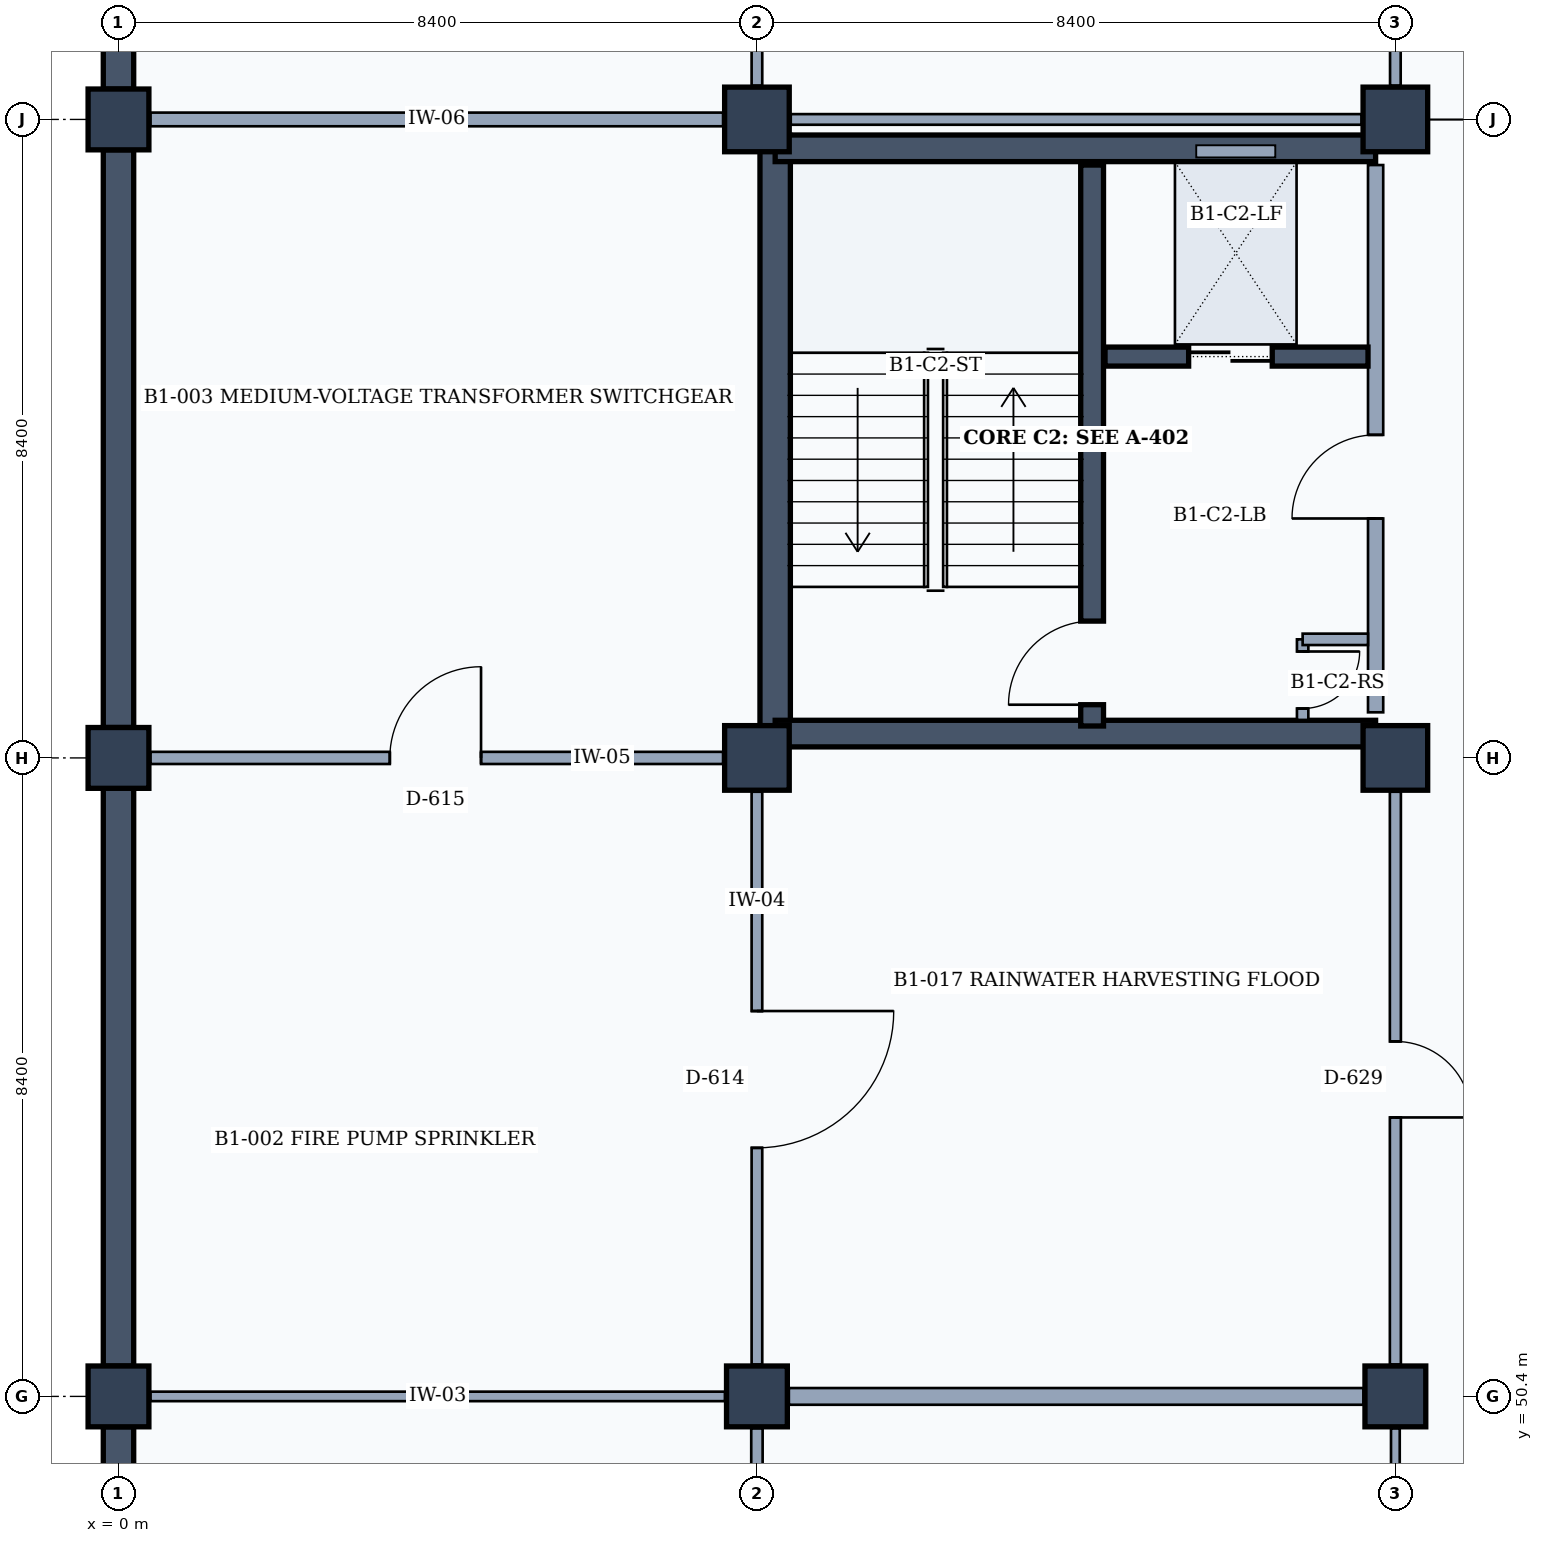
"""IFC4 building model, lengths in metres.
Left out: names, types, materials, properties, quantities, classifications, styles, units other than length and angle.
Written with IfcOpenShell. Run it as: python <this file> out.ifc"""

import sys

from ifc_helpers import new_model, si_unit, direction, frame, frame_2d, origin, origin_2d, place, context, subcontext, project, spatial, rectangle, extrude, element, fill, save


model = new_model("IFC4")
c1 = context("Model", 3, precision=1e-05, world=origin(), true_north=direction((0.0, 1.0)))
c2 = subcontext(c1, "Body", "Model", "MODEL_VIEW")
j1 = project(units=[si_unit("LENGTHUNIT", "METRE"), si_unit("PLANEANGLEUNIT", "RADIAN")], contexts=[c1])
p1 = place(None, origin())
s1 = spatial("IfcSite", under=j1, at=p1, CompositionType="ELEMENT")
p2 = place(p1, origin())
s2 = spatial("IfcBuilding", under=s1, at=p2, CompositionType="ELEMENT")
p3 = place(p2, frame((0.0, 0.0, -4.2)))
s3 = spatial("IfcBuildingStorey", under=s2, at=p3, CompositionType="ELEMENT", Elevation=-4.2)
for number, where, z_axis, x_axis in (
    (1, (0.0, 50.4, 0.0), (0.0, 0.0, 1.0), (1.0, 0.0, 0.0)),
    (2, (0.0, 58.8, 0.0), (0.0, 0.0, 1.0), (1.0, 0.0, 0.0)),
    (3, (0.0, 67.2, 0.0), (0.0, 0.0, 1.0), (1.0, 0.0, 0.0)),
    (4, (8.4, 50.4, 0.0), (0.0, 0.0, 1.0), (1.0, 0.0, 0.0)),
):
    element("IfcColumn", number, at=place(p3, frame(where, z_axis=z_axis, x_axis=x_axis)), inside=s3, PredefinedType="COLUMN", context=c2, shape_type="SweptSolid", body=[
        extrude(rectangle(XDim=0.8, YDim=0.8, at=origin_2d()), origin(), (0.0, 0.0, 1.0), 4.2),
    ])
for number, where, z_axis, x_axis in (
    (5, (8.4, 58.8, 0.0), (0.0, 0.0, 1.0), (1.0, 0.0, 0.0)),
    (6, (8.4, 67.2, 0.0), (0.0, 0.0, 1.0), (1.0, 0.0, 0.0)),
):
    element("IfcColumn", number, at=place(p3, frame(where, z_axis=z_axis, x_axis=x_axis)), inside=s3, PredefinedType="COLUMN", context=c2, shape_type="SweptSolid", body=[
        extrude(rectangle(XDim=0.85, YDim=0.85, at=origin_2d()), origin(), (0.0, 0.0, 1.0), 4.2),
    ])
p4 = place(p3, frame((16.8, 50.4, 0.0), z_axis=(0.0, 0.0, 1.0), x_axis=(1.0, 0.0, 0.0)))
e7 = element("IfcColumn", 7, at=p4, inside=s3, PredefinedType="COLUMN", context=c2, shape_type="SweptSolid", body=[
    extrude(rectangle(XDim=0.8, YDim=0.8, at=origin_2d()), origin(), (0.0, 0.0, 1.0), 4.2),
])
for number, where, z_axis, x_axis in (
    (8, (16.8, 58.8, 0.0), (0.0, 0.0, 1.0), (1.0, 0.0, 0.0)),
    (9, (16.8, 67.2, 0.0), (0.0, 0.0, 1.0), (1.0, 0.0, 0.0)),
):
    element("IfcColumn", number, at=place(p3, frame(where, z_axis=z_axis, x_axis=x_axis)), inside=s3, PredefinedType="COLUMN", context=c2, shape_type="SweptSolid", body=[
        extrude(rectangle(XDim=0.85, YDim=0.85, at=origin_2d()), origin(), (0.0, 0.0, 1.0), 4.2),
    ])
p5 = place(p3, frame((0.0, 42.325, 0.0), z_axis=(0.0, 0.0, 1.0), x_axis=(0.0, 1.0, 0.0)))
e10 = element("IfcWall", 10, at=p5, inside=s3, PredefinedType="STANDARD", context=c2, shape_type="SweptSolid", body=[
    extrude(rectangle(XDim=7.675, YDim=0.4, at=frame_2d((3.837, 0.0))), origin(), (0.0, 0.0, 1.0), 3.88),
])
p6 = place(p3, frame((0.0, 50.8, 0.0), z_axis=(0.0, 0.0, 1.0), x_axis=(0.0, 1.0, 0.0)))
e11 = element("IfcWall", 11, at=p6, inside=s3, PredefinedType="STANDARD", context=c2, shape_type="SweptSolid", body=[
    extrude(rectangle(XDim=7.6, YDim=0.4, at=frame_2d((3.8, 0.0))), origin(), (0.0, 0.0, 1.0), 3.88),
])
p7 = place(p3, frame((0.0, 59.2, 0.0), z_axis=(0.0, 0.0, 1.0), x_axis=(0.0, 1.0, 0.0)))
e12 = element("IfcWall", 12, at=p7, inside=s3, PredefinedType="STANDARD", context=c2, shape_type="SweptSolid", body=[
    extrude(rectangle(XDim=7.6, YDim=0.4, at=frame_2d((3.8, 0.0))), origin(), (0.0, 0.0, 1.0), 3.88),
])
p8 = place(p3, frame((0.0, 67.6, 0.0), z_axis=(0.0, 0.0, 1.0), x_axis=(0.0, 1.0, 0.0)))
e13 = element("IfcWall", 13, at=p8, inside=s3, PredefinedType="STANDARD", context=c2, shape_type="SweptSolid", body=[
    extrude(rectangle(XDim=7.6, YDim=0.4, at=frame_2d((3.8, 0.0))), origin(), (0.0, 0.0, 1.0), 3.88),
])
p9 = place(p3, frame((8.64, 59.05, 0.0), z_axis=(0.0, 0.0, 1.0), x_axis=(0.0, 1.0, 0.0)))
e14 = element("IfcWall", 14, at=p9, inside=s3, PredefinedType="SHEAR", context=c2, shape_type="SweptSolid", body=[
    extrude(rectangle(XDim=7.94, YDim=0.4, at=frame_2d((3.97, 0.0))), origin(), (0.0, 0.0, 1.0), 3.9),
])
p10 = place(p3, frame((8.64, 66.82, 0.0), z_axis=(0.0, 0.0, 1.0), x_axis=(1.0, 0.0, 0.0)))
e15 = element("IfcWall", 15, at=p10, inside=s3, PredefinedType="SHEAR", context=c2, shape_type="SweptSolid", body=[
    extrude(rectangle(XDim=7.9, YDim=0.35, at=frame_2d((3.95, 0.0))), origin(), (0.0, 0.0, 1.0), 3.9),
])
p11 = place(p3, frame((16.54, 66.6, 0.0), z_axis=(0.0, 0.0, 1.0), x_axis=(0.0, -1.0, 0.0)))
e16 = element("IfcWall", 16, at=p11, inside=s3, PredefinedType="PARTITIONING", context=c2, shape_type="SweptSolid", body=[
    extrude(rectangle(XDim=7.2, YDim=0.2, at=frame_2d((3.6, 0.0))), origin(), (0.0, 0.0, 1.0), 3.25),
])
p12 = place(p11, frame((3.55, 0.0, 0.0)))
e17 = element("IfcOpeningElement", 17, at=p12, cuts=e16, PredefinedType="OPENING", context=c2, shape_type="SweptSolid", body=[
    extrude(rectangle(XDim=1.1, YDim=2.15, at=frame_2d((0.55, 1.075))), frame((0.0, 0.11, 0.0), z_axis=(0.0, -1.0, 0.0), x_axis=(1.0, 0.0, 0.0)), (0.0, 0.0, 1.0), 0.22),
])
p13 = place(p3, frame((16.54, 59.12, 0.0), z_axis=(0.0, 0.0, 1.0), x_axis=(-1.0, 0.0, 0.0)))
e18 = element("IfcWall", 18, at=p13, inside=s3, PredefinedType="SHEAR", context=c2, shape_type="SweptSolid", body=[
    extrude(rectangle(XDim=7.9, YDim=0.35, at=frame_2d((3.95, 0.0))), origin(), (0.0, 0.0, 1.0), 3.9),
])
p14 = place(p3, frame((12.81, 59.22, 0.0), z_axis=(0.0, 0.0, 1.0), x_axis=(0.0, 1.0, 0.0)))
e19 = element("IfcWall", 19, at=p14, inside=s3, PredefinedType="SHEAR", context=c2, shape_type="SweptSolid", body=[
    extrude(rectangle(XDim=7.38, YDim=0.3, at=frame_2d((3.69, 0.0))), origin(), (0.0, 0.0, 1.0), 3.9),
])
p15 = place(p14, frame((0.28, 0.0, 0.0)))
e20 = element("IfcOpeningElement", 20, at=p15, cuts=e19, PredefinedType="OPENING", context=c2, shape_type="SweptSolid", body=[
    extrude(rectangle(XDim=1.1, YDim=2.15, at=frame_2d((0.55, 1.075))), frame((0.0, 0.16, 0.0), z_axis=(0.0, -1.0, 0.0), x_axis=(1.0, 0.0, 0.0)), (0.0, 0.0, 1.0), 0.32),
])
p16 = place(p3, frame((15.58, 60.36, 0.0), z_axis=(0.0, 0.0, 1.0), x_axis=(0.0, -1.0, 0.0)))
e21 = element("IfcWall", 21, at=p16, inside=s3, PredefinedType="PARTITIONING", context=c2, shape_type="SweptSolid", body=[
    extrude(rectangle(XDim=1.06, YDim=0.15, at=frame_2d((0.53, 0.0))), origin(), (0.0, 0.0, 1.0), 3.32),
])
p17 = place(p16, frame((0.16, 0.0, 0.0)))
e22 = element("IfcOpeningElement", 22, at=p17, cuts=e21, PredefinedType="OPENING", context=c2, shape_type="SweptSolid", body=[
    extrude(rectangle(XDim=0.75, YDim=2.05, at=frame_2d((0.375, 1.025))), frame((0.0, 0.085, 0.0), z_axis=(0.0, -1.0, 0.0), x_axis=(1.0, 0.0, 0.0)), (0.0, 0.0, 1.0), 0.17),
])
p18 = place(p3, frame((15.58, 60.36, 0.0), z_axis=(0.0, 0.0, 1.0), x_axis=(1.0, 0.0, 0.0)))
e23 = element("IfcWall", 23, at=p18, inside=s3, PredefinedType="PARTITIONING", context=c2, shape_type="SweptSolid", body=[
    extrude(rectangle(XDim=0.86, YDim=0.15, at=frame_2d((0.43, 0.0))), origin(), (0.0, 0.0, 1.0), 3.32),
])
p19 = place(p3, frame((12.98, 64.08, 0.0), z_axis=(0.0, 0.0, 1.0), x_axis=(1.0, 0.0, 0.0)))
e24 = element("IfcWall", 24, at=p19, inside=s3, PredefinedType="SHEAR", context=c2, shape_type="SweptSolid", body=[
    extrude(rectangle(XDim=3.46, YDim=0.25, at=frame_2d((1.73, 0.0))), origin(), (0.0, 0.0, 1.0), 3.9),
])
p20 = place(p19, frame((1.1, 0.0, 0.0)))
e25 = element("IfcOpeningElement", 25, at=p20, cuts=e24, PredefinedType="OPENING", context=c2, shape_type="SweptSolid", body=[
    extrude(rectangle(XDim=1.1, YDim=2.15, at=frame_2d((0.55, 1.075))), frame((0.0, 0.135, 0.0), z_axis=(0.0, -1.0, 0.0), x_axis=(1.0, 0.0, 0.0)), (0.0, 0.0, 1.0), 0.27),
])
p21 = place(p3, frame((8.4, 42.345, 0.0), z_axis=(0.0, 0.0, 1.0), x_axis=(0.0, 1.0, 0.0)))
e26 = element("IfcWall", 26, at=p21, inside=s3, PredefinedType="PARTITIONING", context=c2, shape_type="SweptSolid", body=[
    extrude(rectangle(XDim=7.635, YDim=0.15, at=frame_2d((3.817, 0.0))), origin(), (0.0, 0.0, 1.0), 3.25),
])
p22 = place(p21, frame((3.275, 0.0, 0.0)))
e27 = element("IfcOpeningElement", 27, at=p22, cuts=e26, PredefinedType="OPENING", context=c2, shape_type="SweptSolid", body=[
    extrude(rectangle(XDim=0.95, YDim=2.15, at=frame_2d((0.475, 1.075))), frame((0.0, 0.085, 0.0), z_axis=(0.0, -1.0, 0.0), x_axis=(1.0, 0.0, 0.0)), (0.0, 0.0, 1.0), 0.17),
])
p23 = place(p3, frame((0.42, 50.4, 0.0), z_axis=(0.0, 0.0, 1.0), x_axis=(1.0, 0.0, 0.0)))
e28 = element("IfcWall", 28, at=p23, inside=s3, PredefinedType="PARTITIONING", context=c2, shape_type="SweptSolid", body=[
    extrude(rectangle(XDim=7.56, YDim=0.125, at=frame_2d((3.78, 0.0))), origin(), (0.0, 0.0, 1.0), 3.05),
])
p24 = place(p3, frame((8.4, 50.82, 0.0), z_axis=(0.0, 0.0, 1.0), x_axis=(0.0, 1.0, 0.0)))
e29 = element("IfcWall", 29, at=p24, inside=s3, PredefinedType="PARTITIONING", context=c2, shape_type="SweptSolid", body=[
    extrude(rectangle(XDim=7.535, YDim=0.14, at=frame_2d((3.768, 0.0))), origin(), (0.0, 0.0, 1.0), 3.25),
])
p25 = place(p24, frame((2.85, 0.0, 0.0)))
e30 = element("IfcOpeningElement", 30, at=p25, cuts=e29, PredefinedType="OPENING", context=c2, shape_type="SweptSolid", body=[
    extrude(rectangle(XDim=1.8, YDim=2.3, at=frame_2d((0.9, 1.15))), frame((0.0, 0.08, 0.0), z_axis=(0.0, -1.0, 0.0), x_axis=(1.0, 0.0, 0.0)), (0.0, 0.0, 1.0), 0.16),
])
p26 = place(p3, frame((0.42, 58.8, 0.0), z_axis=(0.0, 0.0, 1.0), x_axis=(1.0, 0.0, 0.0)))
e31 = element("IfcWall", 31, at=p26, inside=s3, PredefinedType="PARTITIONING", context=c2, shape_type="SweptSolid", body=[
    extrude(rectangle(XDim=7.535, YDim=0.16, at=frame_2d((3.768, 0.0))), origin(), (0.0, 0.0, 1.0), 3.05),
])
p27 = place(p26, frame((3.15, 0.0, 0.0)))
e32 = element("IfcOpeningElement", 32, at=p27, cuts=e31, PredefinedType="OPENING", context=c2, shape_type="SweptSolid", body=[
    extrude(rectangle(XDim=1.2, YDim=2.2, at=frame_2d((0.6, 1.1))), frame((0.0, 0.09, 0.0), z_axis=(0.0, -1.0, 0.0), x_axis=(1.0, 0.0, 0.0)), (0.0, 0.0, 1.0), 0.18),
])
p28 = place(p3, frame((0.42, 67.2, 0.0), z_axis=(0.0, 0.0, 1.0), x_axis=(1.0, 0.0, 0.0)))
e33 = element("IfcWall", 33, at=p28, inside=s3, PredefinedType="PARTITIONING", context=c2, shape_type="SweptSolid", body=[
    extrude(rectangle(XDim=7.535, YDim=0.18, at=frame_2d((3.768, 0.0))), origin(), (0.0, 0.0, 1.0), 3.05),
])
p29 = place(p3, frame((8.4, 67.645, 0.0), z_axis=(0.0, 0.0, 1.0), x_axis=(0.0, 1.0, 0.0)))
e34 = element("IfcWall", 34, at=p29, inside=s3, PredefinedType="PARTITIONING", context=c2, shape_type="SweptSolid", body=[
    extrude(rectangle(XDim=7.535, YDim=0.14, at=frame_2d((3.768, 0.0))), origin(), (0.0, 0.0, 1.0), 3.25),
])
p30 = place(p3, frame((16.8, 42.345, 0.0), z_axis=(0.0, 0.0, 1.0), x_axis=(0.0, 1.0, 0.0)))
e35 = element("IfcWall", 35, at=p30, inside=s3, PredefinedType="PARTITIONING", context=c2, shape_type="SweptSolid", body=[
    extrude(rectangle(XDim=7.635, YDim=0.115, at=frame_2d((3.817, 0.0))), origin(), (0.0, 0.0, 1.0), 3.25),
])
p31 = place(p30, frame((3.025, 0.0, 0.0)))
e36 = element("IfcOpeningElement", 36, at=p31, cuts=e35, PredefinedType="OPENING", context=c2, shape_type="SweptSolid", body=[
    extrude(rectangle(XDim=1.45, YDim=2.35, at=frame_2d((0.725, 1.175))), frame((0.0, 0.067, 0.0), z_axis=(0.0, -1.0, 0.0), x_axis=(1.0, 0.0, 0.0)), (0.0, 0.0, 1.0), 0.135),
])
p32 = place(p3, frame((8.82, 50.4, 0.0), z_axis=(0.0, 0.0, 1.0), x_axis=(1.0, 0.0, 0.0)))
e37 = element("IfcWall", 37, at=p32, inside=s3, PredefinedType="PARTITIONING", context=c2, shape_type="SweptSolid", body=[
    extrude(rectangle(XDim=7.56, YDim=0.22, at=frame_2d((3.78, 0.0))), origin(), (0.0, 0.0, 1.0), 3.05),
])
p33 = place(p3, frame((16.8, 50.82, 0.0), z_axis=(0.0, 0.0, 1.0), x_axis=(0.0, 1.0, 0.0)))
e38 = element("IfcWall", 38, at=p33, inside=s3, PredefinedType="PARTITIONING", context=c2, shape_type="SweptSolid", body=[
    extrude(rectangle(XDim=7.535, YDim=0.145, at=frame_2d((3.768, 0.0))), origin(), (0.0, 0.0, 1.0), 3.25),
])
p34 = place(p33, frame((3.25, 0.0, 0.0)))
e39 = element("IfcOpeningElement", 39, at=p34, cuts=e38, PredefinedType="OPENING", context=c2, shape_type="SweptSolid", body=[
    extrude(rectangle(XDim=1.0, YDim=2.15, at=frame_2d((0.5, 1.075))), frame((0.0, 0.083, 0.0), z_axis=(0.0, -1.0, 0.0), x_axis=(1.0, 0.0, 0.0)), (0.0, 0.0, 1.0), 0.165),
])
p35 = place(p3, frame((8.845, 67.2, 0.0), z_axis=(0.0, 0.0, 1.0), x_axis=(1.0, 0.0, 0.0)))
e40 = element("IfcWall", 40, at=p35, inside=s3, PredefinedType="PARTITIONING", context=c2, shape_type="SweptSolid", body=[
    extrude(rectangle(XDim=7.51, YDim=0.14, at=frame_2d((3.755, 0.0))), origin(), (0.0, 0.0, 1.0), 3.05),
])
p36 = place(p3, frame((16.8, 67.645, 0.0), z_axis=(0.0, 0.0, 1.0), x_axis=(0.0, 1.0, 0.0)))
e41 = element("IfcWall", 41, at=p36, inside=s3, PredefinedType="PARTITIONING", context=c2, shape_type="SweptSolid", body=[
    extrude(rectangle(XDim=7.535, YDim=0.14, at=frame_2d((3.768, 0.0))), origin(), (0.0, 0.0, 1.0), 3.25),
])
p37 = place(p36, frame((3.275, 0.0, 0.0)))
e42 = element("IfcOpeningElement", 42, at=p37, cuts=e41, PredefinedType="OPENING", context=c2, shape_type="SweptSolid", body=[
    extrude(rectangle(XDim=0.95, YDim=2.15, at=frame_2d((0.475, 1.075))), frame((0.0, 0.08, 0.0), z_axis=(0.0, -1.0, 0.0), x_axis=(1.0, 0.0, 0.0)), (0.0, 0.0, 1.0), 0.16),
])
p38 = place(p12, frame((1.1, 0.0, 0.0), z_axis=(0.0, 0.0, 1.0), x_axis=(-1.0, 0.0, 0.0)))
e43 = element("IfcDoor", 43, at=p38, inside=s3, OperationType="SINGLE_SWING_LEFT", PredefinedType="DOOR", context=c2, shape_type="SweptSolid", body=[
    extrude(rectangle(XDim=1.1, YDim=2.15, at=frame_2d((0.55, 1.075))), frame((0.0, 0.025, 0.0), z_axis=(0.0, -1.0, 0.0), x_axis=(1.0, 0.0, 0.0)), (0.0, 0.0, 1.0), 0.05),
])
fill(e17, e43)
p39 = place(p15, origin())
e44 = element("IfcDoor", 44, at=p39, inside=s3, OperationType="SINGLE_SWING_LEFT", PredefinedType="DOOR", context=c2, shape_type="SweptSolid", body=[
    extrude(rectangle(XDim=1.1, YDim=2.15, at=frame_2d((0.55, 1.075))), frame((0.0, 0.025, 0.0), z_axis=(0.0, -1.0, 0.0), x_axis=(1.0, 0.0, 0.0)), (0.0, 0.0, 1.0), 0.05),
])
fill(e20, e44)
p40 = place(p17, origin())
e45 = element("IfcDoor", 45, at=p40, inside=s3, OperationType="SINGLE_SWING_LEFT", PredefinedType="TRAPDOOR", context=c2, shape_type="SweptSolid", body=[
    extrude(rectangle(XDim=0.75, YDim=2.05, at=frame_2d((0.375, 1.025))), frame((0.0, 0.025, 0.0), z_axis=(0.0, -1.0, 0.0), x_axis=(1.0, 0.0, 0.0)), (0.0, 0.0, 1.0), 0.05),
])
fill(e22, e45)
p41 = place(p20, origin())
e46 = element("IfcDoor", 46, at=p41, inside=s3, OperationType="DOUBLE_DOOR_SLIDING", PredefinedType="DOOR", context=c2, shape_type="SweptSolid", body=[
    extrude(rectangle(XDim=1.1, YDim=2.15, at=frame_2d((0.55, 1.075))), frame((0.0, 0.025, 0.0), z_axis=(0.0, -1.0, 0.0), x_axis=(1.0, 0.0, 0.0)), (0.0, 0.0, 1.0), 0.05),
])
fill(e25, e46)
p42 = place(p25, frame((1.8, 0.0, 0.0), z_axis=(0.0, 0.0, 1.0), x_axis=(-1.0, 0.0, 0.0)))
e47 = element("IfcDoor", 47, at=p42, inside=s3, OperationType="SINGLE_SWING_LEFT", PredefinedType="DOOR", context=c2, shape_type="SweptSolid", body=[
    extrude(rectangle(XDim=1.8, YDim=2.3, at=frame_2d((0.9, 1.15))), frame((0.0, 0.025, 0.0), z_axis=(0.0, -1.0, 0.0), x_axis=(1.0, 0.0, 0.0)), (0.0, 0.0, 1.0), 0.05),
])
fill(e30, e47)
p43 = place(p27, origin())
e48 = element("IfcDoor", 48, at=p43, inside=s3, OperationType="SINGLE_SWING_RIGHT", PredefinedType="DOOR", context=c2, shape_type="SweptSolid", body=[
    extrude(rectangle(XDim=1.2, YDim=2.2, at=frame_2d((0.6, 1.1))), frame((0.0, 0.025, 0.0), z_axis=(0.0, -1.0, 0.0), x_axis=(1.0, 0.0, 0.0)), (0.0, 0.0, 1.0), 0.05),
])
fill(e32, e48)
p44 = place(p34, frame((1.0, 0.0, 0.0), z_axis=(0.0, 0.0, 1.0), x_axis=(-1.0, 0.0, 0.0)))
e49 = element("IfcDoor", 49, at=p44, inside=s3, OperationType="SINGLE_SWING_RIGHT", PredefinedType="DOOR", context=c2, shape_type="SweptSolid", body=[
    extrude(rectangle(XDim=1.0, YDim=2.15, at=frame_2d((0.5, 1.075))), frame((0.0, 0.025, 0.0), z_axis=(0.0, -1.0, 0.0), x_axis=(1.0, 0.0, 0.0)), (0.0, 0.0, 1.0), 0.05),
])
fill(e39, e49)
save(model, sys.argv[1])
